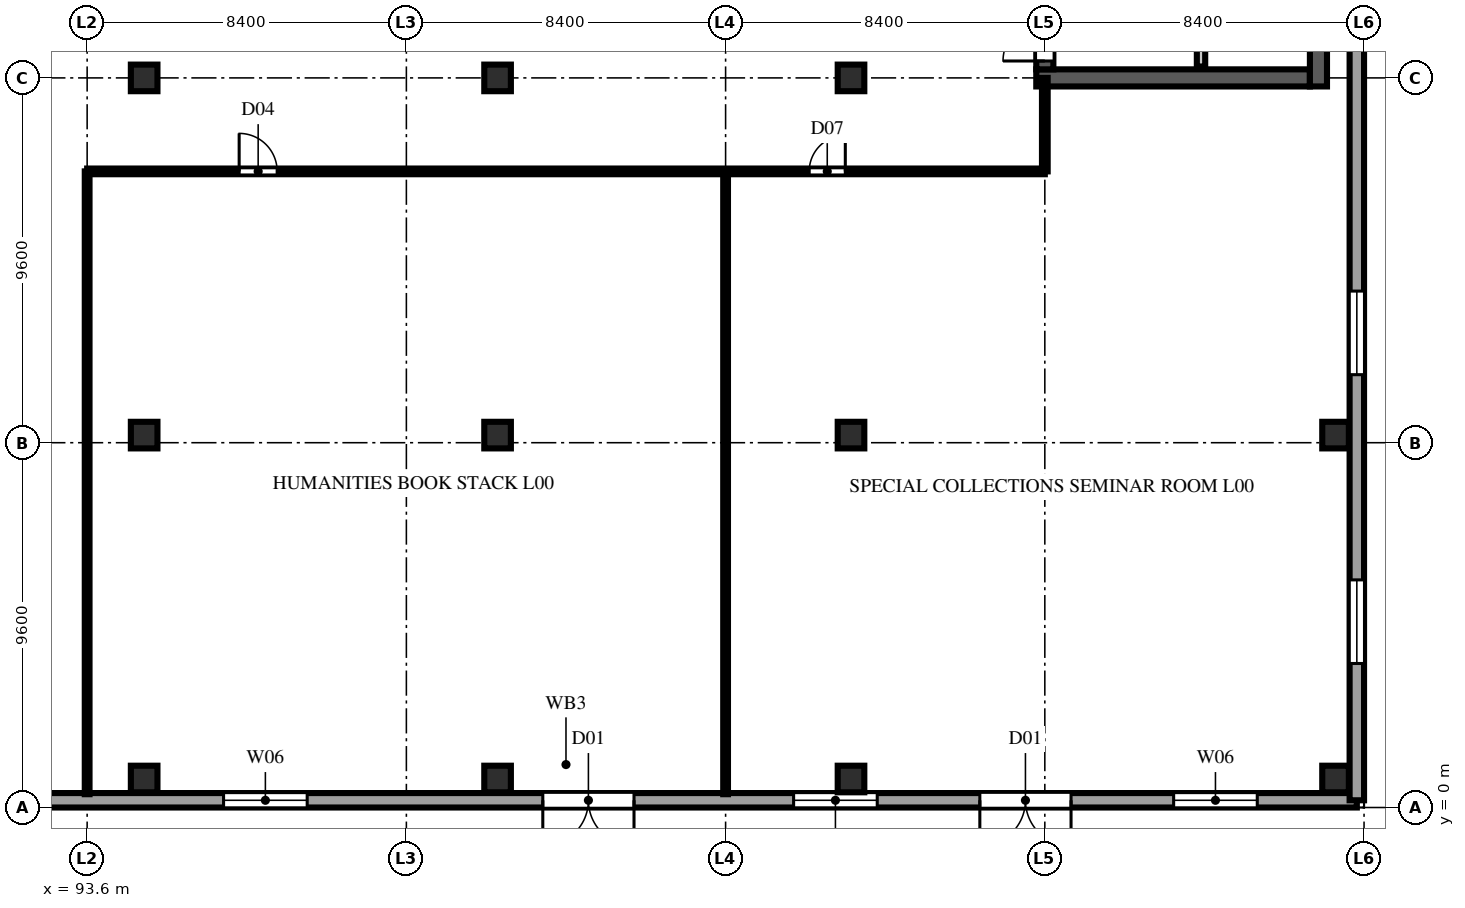
"""IFC4 building model, lengths in metres.
Left out: names, types, materials, properties, quantities, classifications, styles, units other than length and angle.
Written with IfcOpenShell. Run it as: python <this file> out.ifc"""

import sys

from ifc_helpers import new_model, si_unit, direction, frame, frame_2d, origin, origin_2d, place, context, subcontext, project, spatial, rectangle, extrude, element, fill, save


model = new_model("IFC4")
c1 = context("Model", 3, precision=1e-05, world=origin(), true_north=direction((0.0, 1.0)))
c2 = subcontext(c1, "Body", "Model", "MODEL_VIEW")
j1 = project(units=[si_unit("LENGTHUNIT", "METRE"), si_unit("PLANEANGLEUNIT", "RADIAN")], contexts=[c1])
p1 = place(None, origin())
s1 = spatial("IfcSite", under=j1, at=p1, CompositionType="ELEMENT")
p2 = place(p1, origin())
s2 = spatial("IfcBuilding", under=s1, at=p2, CompositionType="ELEMENT")
p3 = place(p2, origin())
s3 = spatial("IfcBuildingStorey", under=s2, at=p3, CompositionType="ELEMENT", Elevation=0.0)
p4 = place(p3, frame((118.575, 19.2, 0.0), z_axis=(0.0, 0.0, 1.0), x_axis=(1.0, 0.0, 0.0)))
e1 = element("IfcWall", 1, at=p4, inside=s3, PredefinedType="SHEAR", context=c2, shape_type="SweptSolid", body=[
    extrude(rectangle(XDim=7.2, YDim=0.45, at=frame_2d((3.6, 0.0))), origin(), (0.0, 0.0, 1.0), 4.85),
])
p5 = place(p3, frame((126.0, 18.975, 0.0), z_axis=(0.0, 0.0, 1.0), x_axis=(0.0, 1.0, 0.0)))
e2 = element("IfcWall", 2, at=p5, inside=s3, PredefinedType="SHEAR", context=c2, shape_type="SweptSolid", body=[
    extrude(rectangle(XDim=19.65, YDim=0.45, at=frame_2d((9.825, 0.0))), origin(), (0.0, 0.0, 1.0), 4.85),
])
p6 = place(p3, frame((118.8, 19.425, 0.0), z_axis=(0.0, 0.0, 1.0), x_axis=(0.0, 1.0, 0.0)))
e3 = element("IfcWall", 3, at=p6, inside=s3, PredefinedType="SHEAR", context=c2, shape_type="SweptSolid", body=[
    extrude(rectangle(XDim=8.575, YDim=0.45, at=frame_2d((4.288, 0.0))), origin(), (0.0, 0.0, 1.0), 4.85),
])
p7 = place(p6, frame((0.22, 0.0, 0.0)))
e4 = element("IfcOpeningElement", 4, at=p7, cuts=e3, PredefinedType="OPENING", context=c2, shape_type="SweptSolid", body=[
    extrude(rectangle(XDim=1.1, YDim=2.2, at=frame_2d((0.55, 1.1))), frame((0.0, 0.237, 0.0), z_axis=(0.0, -1.0, 0.0), x_axis=(1.0, 0.0, 0.0)), (0.0, 0.0, 1.0), 0.474),
])
for number, where, z_axis, x_axis in (
    (5, (95.1, 0.75, 0.0), (0.0, 0.0, 1.0), (1.0, 0.0, 0.0)),
    (6, (95.1, 9.8, 0.0), (0.0, 0.0, 1.0), (1.0, 0.0, 0.0)),
    (7, (95.1, 19.2, 0.0), (0.0, 0.0, 1.0), (1.0, 0.0, 0.0)),
    (8, (104.4, 0.75, 0.0), (0.0, 0.0, 1.0), (1.0, 0.0, 0.0)),
    (9, (104.4, 9.8, 0.0), (0.0, 0.0, 1.0), (1.0, 0.0, 0.0)),
    (10, (104.4, 19.2, 0.0), (0.0, 0.0, 1.0), (1.0, 0.0, 0.0)),
    (11, (113.7, 0.75, 0.0), (0.0, 0.0, 1.0), (1.0, 0.0, 0.0)),
    (12, (113.7, 9.8, 0.0), (0.0, 0.0, 1.0), (1.0, 0.0, 0.0)),
    (13, (113.7, 19.2, 0.0), (0.0, 0.0, 1.0), (1.0, 0.0, 0.0)),
    (14, (126.45, 0.75, 0.0), (0.0, 0.0, 1.0), (1.0, 0.0, 0.0)),
    (15, (126.45, 9.8, 0.0), (0.0, 0.0, 1.0), (1.0, 0.0, 0.0)),
):
    element("IfcColumn", number, at=place(p3, frame(where, z_axis=z_axis, x_axis=x_axis)), inside=s3, PredefinedType="COLUMN", context=c2, shape_type="SweptSolid", body=[
        extrude(rectangle(XDim=0.7, YDim=0.7, at=origin_2d()), origin(), (0.0, 0.0, 1.0), 5.2),
    ])
p8 = place(p3, frame((85.39, 0.19, 0.0), z_axis=(0.0, 0.0, 1.0), x_axis=(1.0, 0.0, 0.0)))
e16 = element("IfcWall", 16, at=p8, inside=s3, PredefinedType="SOLIDWALL", context=c2, shape_type="SweptSolid", body=[
    extrude(rectangle(XDim=41.62, YDim=0.38, at=frame_2d((20.81, 0.0))), origin(), (0.0, 0.0, 1.0), 4.85),
])
p9 = place(p8, frame((5.0, 0.0, 0.85)))
e17 = element("IfcOpeningElement", 17, at=p9, cuts=e16, PredefinedType="OPENING", context=c2, shape_type="SweptSolid", body=[
    extrude(rectangle(XDim=2.2, YDim=2.25, at=frame_2d((1.1, 1.125))), frame((0.0, 0.202, 0.0), z_axis=(0.0, -1.0, 0.0), x_axis=(1.0, 0.0, 0.0)), (0.0, 0.0, 1.0), 0.404),
])
p10 = place(p8, frame((11.8, 0.0, 0.85)))
e18 = element("IfcOpeningElement", 18, at=p10, cuts=e16, PredefinedType="OPENING", context=c2, shape_type="SweptSolid", body=[
    extrude(rectangle(XDim=2.2, YDim=2.25, at=frame_2d((1.1, 1.125))), frame((0.0, 0.202, 0.0), z_axis=(0.0, -1.0, 0.0), x_axis=(1.0, 0.0, 0.0)), (0.0, 0.0, 1.0), 0.404),
])
p11 = place(p8, frame((20.2, 0.0, 0.0)))
e19 = element("IfcOpeningElement", 19, at=p11, cuts=e16, PredefinedType="OPENING", context=c2, shape_type="SweptSolid", body=[
    extrude(rectangle(XDim=2.4, YDim=2.6, at=frame_2d((1.2, 1.3))), frame((0.0, 0.202, 0.0), z_axis=(0.0, -1.0, 0.0), x_axis=(1.0, 0.0, 0.0)), (0.0, 0.0, 1.0), 0.404),
])
p12 = place(p8, frame((26.8, 0.0, 0.85)))
e20 = element("IfcOpeningElement", 20, at=p12, cuts=e16, PredefinedType="OPENING", context=c2, shape_type="SweptSolid", body=[
    extrude(rectangle(XDim=2.2, YDim=2.25, at=frame_2d((1.1, 1.125))), frame((0.0, 0.202, 0.0), z_axis=(0.0, -1.0, 0.0), x_axis=(1.0, 0.0, 0.0)), (0.0, 0.0, 1.0), 0.404),
])
p13 = place(p8, frame((36.8, 0.0, 0.85)))
e21 = element("IfcOpeningElement", 21, at=p13, cuts=e16, PredefinedType="OPENING", context=c2, shape_type="SweptSolid", body=[
    extrude(rectangle(XDim=2.2, YDim=2.25, at=frame_2d((1.1, 1.125))), frame((0.0, 0.202, 0.0), z_axis=(0.0, -1.0, 0.0), x_axis=(1.0, 0.0, 0.0)), (0.0, 0.0, 1.0), 0.404),
])
p14 = place(p8, frame((31.7, 0.0, 0.0)))
e22 = element("IfcOpeningElement", 22, at=p14, cuts=e16, PredefinedType="OPENING", context=c2, shape_type="SweptSolid", body=[
    extrude(rectangle(XDim=2.4, YDim=2.6, at=frame_2d((1.2, 1.3))), frame((0.0, 0.202, 0.0), z_axis=(0.0, -1.0, 0.0), x_axis=(1.0, 0.0, 0.0)), (0.0, 0.0, 1.0), 0.404),
])
p15 = place(p3, frame((127.01, 0.19, 0.0), z_axis=(0.0, 0.0, 1.0), x_axis=(0.0, 1.0, 0.0)))
e23 = element("IfcWall", 23, at=p15, inside=s3, PredefinedType="SOLIDWALL", context=c2, shape_type="SweptSolid", body=[
    extrude(rectangle(XDim=57.22, YDim=0.38, at=frame_2d((28.61, 0.0))), origin(), (0.0, 0.0, 1.0), 4.85),
])
p16 = place(p15, frame((3.6, 0.0, 0.85)))
e24 = element("IfcOpeningElement", 24, at=p16, cuts=e23, PredefinedType="OPENING", context=c2, shape_type="SweptSolid", body=[
    extrude(rectangle(XDim=2.2, YDim=2.25, at=frame_2d((1.1, 1.125))), frame((0.0, 0.202, 0.0), z_axis=(0.0, -1.0, 0.0), x_axis=(1.0, 0.0, 0.0)), (0.0, 0.0, 1.0), 0.404),
])
p17 = place(p15, frame((11.2, 0.0, 0.85)))
e25 = element("IfcOpeningElement", 25, at=p17, cuts=e23, PredefinedType="OPENING", context=c2, shape_type="SweptSolid", body=[
    extrude(rectangle(XDim=2.2, YDim=2.25, at=frame_2d((1.1, 1.125))), frame((0.0, 0.202, 0.0), z_axis=(0.0, -1.0, 0.0), x_axis=(1.0, 0.0, 0.0)), (0.0, 0.0, 1.0), 0.404),
])
p18 = place(p15, frame((41.6, 0.0, 0.85)))
e26 = element("IfcOpeningElement", 26, at=p18, cuts=e23, PredefinedType="OPENING", context=c2, shape_type="SweptSolid", body=[
    extrude(rectangle(XDim=2.2, YDim=2.25, at=frame_2d((1.1, 1.125))), frame((0.0, 0.202, 0.0), z_axis=(0.0, -1.0, 0.0), x_axis=(1.0, 0.0, 0.0)), (0.0, 0.0, 1.0), 0.404),
])
p19 = place(p15, frame((49.2, 0.0, 0.85)))
e27 = element("IfcOpeningElement", 27, at=p19, cuts=e23, PredefinedType="OPENING", context=c2, shape_type="SweptSolid", body=[
    extrude(rectangle(XDim=2.2, YDim=2.25, at=frame_2d((1.1, 1.125))), frame((0.0, 0.202, 0.0), z_axis=(0.0, -1.0, 0.0), x_axis=(1.0, 0.0, 0.0)), (0.0, 0.0, 1.0), 0.404),
])
p20 = place(p3, frame((122.91, 19.5, 0.0), z_axis=(0.0, 0.0, 1.0), x_axis=(0.0, 1.0, 0.0)))
e28 = element("IfcWall", 28, at=p20, inside=s3, PredefinedType="SOLIDWALL", context=c2, shape_type="SweptSolid", body=[
    extrude(rectangle(XDim=7.71, YDim=0.22, at=frame_2d((3.855, 0.0))), origin(), (0.0, 0.0, 1.0), 4.85),
])
for number, where, z_axis, x_axis in (
    (29, (93.6, 0.35, 0.0), (0.0, 0.0, 1.0), (0.0, 1.0, 0.0)),
    (30, (110.4, 0.35, 0.0), (0.0, 0.0, 1.0), (0.0, 1.0, 0.0)),
):
    element("IfcWall", number, at=place(p3, frame(where, z_axis=z_axis, x_axis=x_axis)), inside=s3, PredefinedType="PARTITIONING", context=c2, shape_type="SweptSolid", body=[
        extrude(rectangle(XDim=16.39, YDim=0.125, at=frame_2d((8.195, 0.0))), origin(), (0.0, 0.0, 1.0), 4.85),
    ])
p21 = place(p3, frame((118.8, 16.74, 0.0), z_axis=(0.0, 0.0, 1.0), x_axis=(0.0, 1.0, 0.0)))
e31 = element("IfcWall", 31, at=p21, inside=s3, PredefinedType="PARTITIONING", context=c2, shape_type="SweptSolid", body=[
    extrude(rectangle(XDim=2.46, YDim=0.15, at=frame_2d((1.23, 0.0))), origin(), (0.0, 0.0, 1.0), 4.85),
])
p22 = place(p3, frame((93.6, 16.74, 0.0), z_axis=(0.0, 0.0, 1.0), x_axis=(1.0, 0.0, 0.0)))
e32 = element("IfcWall", 32, at=p22, inside=s3, PredefinedType="PARTITIONING", context=c2, shape_type="SweptSolid", body=[
    extrude(rectangle(XDim=25.2, YDim=0.15, at=frame_2d((12.6, 0.0))), origin(), (0.0, 0.0, 1.0), 4.85),
])
p23 = place(p22, frame((4.0, 0.0, 0.0)))
e33 = element("IfcOpeningElement", 33, at=p23, cuts=e32, PredefinedType="OPENING", context=c2, shape_type="SweptSolid", body=[
    extrude(rectangle(XDim=1.0, YDim=2.2, at=frame_2d((0.5, 1.1))), frame((0.0, 0.087, 0.0), z_axis=(0.0, -1.0, 0.0), x_axis=(1.0, 0.0, 0.0)), (0.0, 0.0, 1.0), 0.174),
])
p24 = place(p22, frame((19.0, 0.0, 0.0)))
e34 = element("IfcOpeningElement", 34, at=p24, cuts=e32, PredefinedType="OPENING", context=c2, shape_type="SweptSolid", body=[
    extrude(rectangle(XDim=0.95, YDim=2.15, at=frame_2d((0.475, 1.075))), frame((0.0, 0.087, 0.0), z_axis=(0.0, -1.0, 0.0), x_axis=(1.0, 0.0, 0.0)), (0.0, 0.0, 1.0), 0.174),
])
p25 = place(p10, origin())
e35 = element("IfcWindow", 35, at=p25, inside=s3, PartitioningType="DOUBLE_PANEL_VERTICAL", PredefinedType="WINDOW", context=c2, shape_type="SweptSolid", body=[
    extrude(rectangle(XDim=2.2, YDim=2.25, at=frame_2d((1.1, 1.125))), frame((0.0, 0.11, 0.0), z_axis=(0.0, -1.0, 0.0), x_axis=(1.0, 0.0, 0.0)), (0.0, 0.0, 1.0), 0.06),
])
fill(e18, e35)
p26 = place(p11, frame((2.4, 0.0, 0.0), z_axis=(0.0, 0.0, 1.0), x_axis=(-1.0, 0.0, 0.0)))
e36 = element("IfcDoor", 36, at=p26, inside=s3, OperationType="DOUBLE_SWING_LEFT", PredefinedType="DOOR", context=c2, shape_type="SweptSolid", body=[
    extrude(rectangle(XDim=2.4, YDim=2.6, at=frame_2d((1.2, 1.3))), frame((0.0, 0.025, 0.0), z_axis=(0.0, -1.0, 0.0), x_axis=(1.0, 0.0, 0.0)), (0.0, 0.0, 1.0), 0.05),
])
fill(e19, e36)
p27 = place(p12, origin())
e37 = element("IfcWindow", 37, at=p27, inside=s3, PartitioningType="DOUBLE_PANEL_VERTICAL", PredefinedType="WINDOW", context=c2, shape_type="SweptSolid", body=[
    extrude(rectangle(XDim=2.2, YDim=2.25, at=frame_2d((1.1, 1.125))), frame((0.0, 0.11, 0.0), z_axis=(0.0, -1.0, 0.0), x_axis=(1.0, 0.0, 0.0)), (0.0, 0.0, 1.0), 0.06),
])
fill(e20, e37)
p28 = place(p13, origin())
e38 = element("IfcWindow", 38, at=p28, inside=s3, PartitioningType="DOUBLE_PANEL_VERTICAL", PredefinedType="WINDOW", context=c2, shape_type="SweptSolid", body=[
    extrude(rectangle(XDim=2.2, YDim=2.25, at=frame_2d((1.1, 1.125))), frame((0.0, 0.11, 0.0), z_axis=(0.0, -1.0, 0.0), x_axis=(1.0, 0.0, 0.0)), (0.0, 0.0, 1.0), 0.06),
])
fill(e21, e38)
p29 = place(p16, origin())
e39 = element("IfcWindow", 39, at=p29, inside=s3, PartitioningType="DOUBLE_PANEL_VERTICAL", PredefinedType="WINDOW", context=c2, shape_type="SweptSolid", body=[
    extrude(rectangle(XDim=2.2, YDim=2.25, at=frame_2d((1.1, 1.125))), frame((0.0, 0.11, 0.0), z_axis=(0.0, -1.0, 0.0), x_axis=(1.0, 0.0, 0.0)), (0.0, 0.0, 1.0), 0.06),
])
fill(e24, e39)
p30 = place(p17, origin())
e40 = element("IfcWindow", 40, at=p30, inside=s3, PartitioningType="DOUBLE_PANEL_VERTICAL", PredefinedType="WINDOW", context=c2, shape_type="SweptSolid", body=[
    extrude(rectangle(XDim=2.2, YDim=2.25, at=frame_2d((1.1, 1.125))), frame((0.0, 0.11, 0.0), z_axis=(0.0, -1.0, 0.0), x_axis=(1.0, 0.0, 0.0)), (0.0, 0.0, 1.0), 0.06),
])
fill(e25, e40)
p31 = place(p14, frame((2.4, 0.0, 0.0), z_axis=(0.0, 0.0, 1.0), x_axis=(-1.0, 0.0, 0.0)))
e41 = element("IfcDoor", 41, at=p31, inside=s3, OperationType="DOUBLE_SWING_LEFT", PredefinedType="DOOR", context=c2, shape_type="SweptSolid", body=[
    extrude(rectangle(XDim=2.4, YDim=2.6, at=frame_2d((1.2, 1.3))), frame((0.0, 0.025, 0.0), z_axis=(0.0, -1.0, 0.0), x_axis=(1.0, 0.0, 0.0)), (0.0, 0.0, 1.0), 0.05),
])
fill(e22, e41)
p32 = place(p7, origin())
e42 = element("IfcDoor", 42, at=p32, inside=s3, OperationType="SINGLE_SWING_LEFT", PredefinedType="DOOR", context=c2, shape_type="SweptSolid", body=[
    extrude(rectangle(XDim=1.1, YDim=2.2, at=frame_2d((0.55, 1.1))), frame((0.0, 0.025, 0.0), z_axis=(0.0, -1.0, 0.0), x_axis=(1.0, 0.0, 0.0)), (0.0, 0.0, 1.0), 0.05),
])
fill(e4, e42)
p33 = place(p23, origin())
e43 = element("IfcDoor", 43, at=p33, inside=s3, OperationType="SINGLE_SWING_LEFT", PredefinedType="DOOR", context=c2, shape_type="SweptSolid", body=[
    extrude(rectangle(XDim=1.0, YDim=2.2, at=frame_2d((0.5, 1.1))), frame((0.0, 0.025, 0.0), z_axis=(0.0, -1.0, 0.0), x_axis=(1.0, 0.0, 0.0)), (0.0, 0.0, 1.0), 0.05),
])
fill(e33, e43)
p34 = place(p24, origin())
e44 = element("IfcDoor", 44, at=p34, inside=s3, OperationType="SINGLE_SWING_RIGHT", PredefinedType="DOOR", context=c2, shape_type="SweptSolid", body=[
    extrude(rectangle(XDim=0.95, YDim=2.15, at=frame_2d((0.475, 1.075))), frame((0.0, 0.025, 0.0), z_axis=(0.0, -1.0, 0.0), x_axis=(1.0, 0.0, 0.0)), (0.0, 0.0, 1.0), 0.05),
])
fill(e34, e44)
save(model, sys.argv[1])
